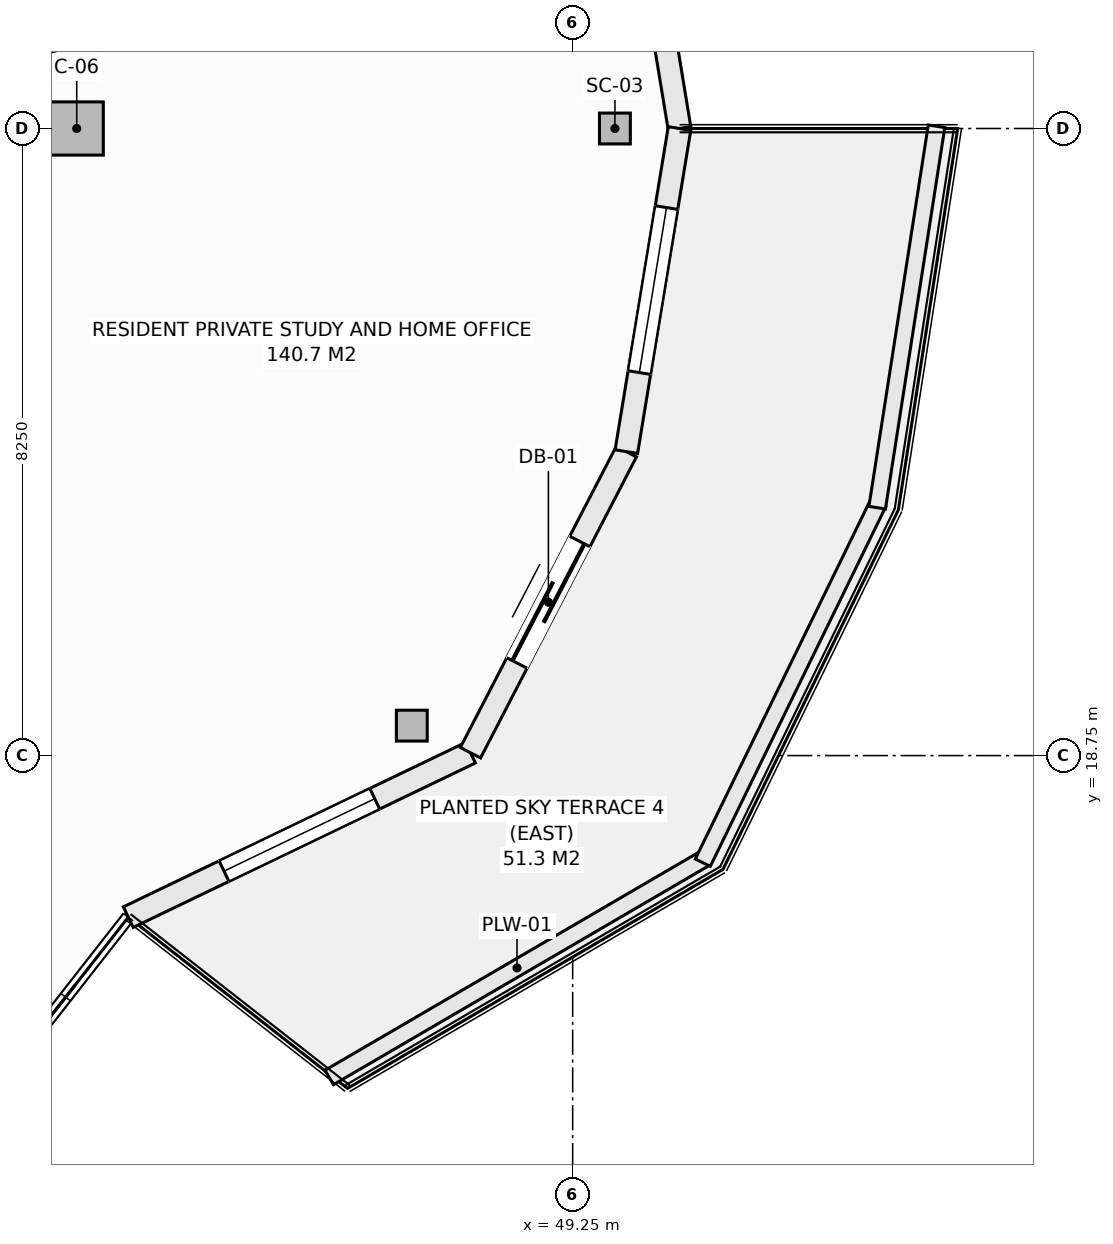
"""IFC4 building model, lengths in metres.
Left out: names, types, materials, properties, quantities, classifications, styles, units other than length and angle.
Written with IfcOpenShell. Run it as: python <this file> out.ifc"""

import sys

from ifc_helpers import new_model, si_unit, direction, frame, frame_2d, origin, origin_2d, place, context, subcontext, project, spatial, rectangle, hollow_rectangle, extrude, element, fill, save


model = new_model("IFC4")
c1 = context("Model", 3, precision=1e-05, world=origin(), true_north=direction((0.0, 1.0)))
c2 = subcontext(c1, "Body", "Model", "MODEL_VIEW")
j1 = project(units=[si_unit("LENGTHUNIT", "METRE"), si_unit("PLANEANGLEUNIT", "RADIAN")], contexts=[c1])
p1 = place(None, origin())
s1 = spatial("IfcSite", under=j1, at=p1, CompositionType="ELEMENT")
p2 = place(p1, origin())
s2 = spatial("IfcBuilding", under=s1, at=p2, CompositionType="ELEMENT")
p3 = place(p2, frame((0.0, 0.0, 265.7)))
s3 = spatial("IfcBuildingStorey", under=s2, at=p3, CompositionType="ELEMENT", Elevation=265.7)
for number, where, z_axis, x_axis in (
    (1, (49.806, 27.0, -0.27), (0.0, 0.0, 1.0), (1.0, 0.0, 0.0)),
    (2, (47.134, 19.144, -0.27), (0.0, 0.0, 1.0), (1.0, 0.0, 0.0)),
):
    element("IfcColumn", number, at=place(p3, frame(where, z_axis=z_axis, x_axis=x_axis)), inside=s3, PredefinedType="COLUMN", context=c2, shape_type="SweptSolid", body=[
        extrude(hollow_rectangle(XDim=0.406, YDim=0.406, WallThickness=0.016, at=origin_2d()), origin(), (0.0, 0.0, 1.0), 3.3),
    ])
p4 = place(p3, frame((42.725, 27.0, -0.27), z_axis=(0.0, 0.0, 1.0), x_axis=(1.0, 0.0, 0.0)))
e3 = element("IfcColumn", 3, at=p4, inside=s3, PredefinedType="COLUMN", context=c2, shape_type="SweptSolid", body=[
    extrude(rectangle(XDim=0.7, YDim=0.7, at=origin_2d()), origin(), (0.0, 0.0, 1.0), 3.3),
])
p5 = place(p3, frame((49.957, 31.251, 0.0), z_axis=(0.0, 0.0, 1.0), x_axis=(0.162404622434, -0.98672424649, 0.0)))
e4 = element("IfcWall", 4, at=p5, inside=s3, PredefinedType="SOLIDWALL", context=c2, shape_type="SweptSolid", body=[
    extrude(rectangle(XDim=4.308, YDim=0.3, at=frame_2d((2.154, 0.0))), origin(), (0.0, 0.0, 1.0), 2.605),
])
p6 = place(p5, frame((1.554, 0.0, 0.72)))
e5 = element("IfcOpeningElement", 5, at=p6, cuts=e4, PredefinedType="OPENING", context=c2, shape_type="SweptSolid", body=[
    extrude(rectangle(XDim=1.2, YDim=1.65, at=frame_2d((0.6, 0.825))), frame((0.0, 0.16, 0.0), z_axis=(0.0, -1.0, 0.0), x_axis=(1.0, 0.0, 0.0)), (0.0, 0.0, 1.0), 0.32),
])
p7 = place(p3, frame((43.404, 16.625, 0.0), z_axis=(0.0, 0.0, 1.0), x_axis=(0.901346013132, 0.433099716706, 0.0)))
e6 = element("IfcWall", 6, at=p7, inside=s3, PredefinedType="SOLIDWALL", context=c2, shape_type="SweptSolid", body=[
    extrude(rectangle(XDim=4.994, YDim=0.3, at=frame_2d((2.497, 0.0))), origin(), (0.0, 0.0, 1.0), 2.605),
])
p8 = place(p7, frame((1.397, 0.0, 0.72)))
e7 = element("IfcOpeningElement", 7, at=p8, cuts=e6, PredefinedType="OPENING", context=c2, shape_type="SweptSolid", body=[
    extrude(rectangle(XDim=2.2, YDim=1.65, at=frame_2d((1.1, 0.825))), frame((0.0, 0.16, 0.0), z_axis=(0.0, -1.0, 0.0), x_axis=(1.0, 0.0, 0.0)), (0.0, 0.0, 1.0), 0.32),
])
p9 = place(p3, frame((47.906, 18.788, 0.0), z_axis=(0.0, 0.0, 1.0), x_axis=(0.459801070243, 0.888021945564, 0.0)))
e8 = element("IfcWall", 8, at=p9, inside=s3, PredefinedType="SOLIDWALL", context=c2, shape_type="SweptSolid", body=[
    extrude(rectangle(XDim=4.461, YDim=0.3, at=frame_2d((2.23, 0.0))), origin(), (0.0, 0.0, 1.0), 2.605),
])
p10 = place(p9, frame((1.33, 0.0, 0.0)))
e9 = element("IfcOpeningElement", 9, at=p10, cuts=e8, PredefinedType="OPENING", context=c2, shape_type="SweptSolid", body=[
    extrude(rectangle(XDim=1.8, YDim=2.25, at=frame_2d((0.9, 1.125))), frame((0.0, 0.16, 0.0), z_axis=(0.0, -1.0, 0.0), x_axis=(1.0, 0.0, 0.0)), (0.0, 0.0, 1.0), 0.32),
])
p11 = place(p3, frame((49.957, 22.749, 0.0), z_axis=(0.0, 0.0, 1.0), x_axis=(0.162404622434, 0.98672424649, 0.0)))
e10 = element("IfcWall", 10, at=p11, inside=s3, PredefinedType="SOLIDWALL", context=c2, shape_type="SweptSolid", body=[
    extrude(rectangle(XDim=4.308, YDim=0.3, at=frame_2d((2.154, 0.0))), origin(), (0.0, 0.0, 1.0), 2.605),
])
p12 = place(p11, frame((1.054, 0.0, 0.72)))
e11 = element("IfcOpeningElement", 11, at=p12, cuts=e10, PredefinedType="OPENING", context=c2, shape_type="SweptSolid", body=[
    extrude(rectangle(XDim=2.2, YDim=1.65, at=frame_2d((1.1, 0.825))), frame((0.0, 0.16, 0.0), z_axis=(0.0, -1.0, 0.0), x_axis=(1.0, 0.0, 0.0)), (0.0, 0.0, 1.0), 0.32),
])
p13 = place(p3, frame((46.048, 14.515, 0.0), z_axis=(0.0, 0.0, 1.0), x_axis=(0.863803671285, 0.503828559606, 0.0)))
e12 = element("IfcWall", 12, at=p13, inside=s3, PredefinedType="PARAPET", context=c2, shape_type="SweptSolid", body=[
    extrude(rectangle(XDim=5.719, YDim=0.22, at=frame_2d((2.86, 0.0))), origin(), (0.0, 0.0, 1.0), 0.52),
])
p14 = place(p3, frame((50.962, 17.341, 0.0), z_axis=(0.0, 0.0, 1.0), x_axis=(0.438469339137, 0.898746148051, 0.0)))
e13 = element("IfcWall", 13, at=p14, inside=s3, PredefinedType="PARAPET", context=c2, shape_type="SweptSolid", body=[
    extrude(rectangle(XDim=5.262, YDim=0.22, at=frame_2d((2.631, 0.0))), origin(), (0.0, 0.0, 1.0), 0.52),
])
p15 = place(p3, frame((53.257, 22.011, 0.0), z_axis=(0.0, 0.0, 1.0), x_axis=(0.15374038442, 0.988111276223, 0.0)))
e14 = element("IfcWall", 14, at=p15, inside=s3, PredefinedType="PARAPET", context=c2, shape_type="SweptSolid", body=[
    extrude(rectangle(XDim=5.078, YDim=0.22, at=frame_2d((2.539, 0.0))), origin(), (0.0, 0.0, 1.0), 0.52),
])
p16 = place(p3, frame((41.582, 27.838, 0.0), z_axis=(0.0, 0.0, 1.0), x_axis=(0.961811765236, 0.273711761262, 0.0)))
e15 = element("IfcWall", 15, at=p16, inside=s3, PredefinedType="PARTITIONING", context=c2, shape_type="SweptSolid", body=[
    extrude(rectangle(XDim=8.722, YDim=0.12, at=frame_2d((4.361, 0.0))), origin(), (0.0, 0.0, 1.0), 3.03),
])
p17 = place(p8, origin())
e16 = element("IfcWindow", 16, at=p17, inside=s3, PartitioningType="SINGLE_PANEL", PredefinedType="WINDOW", context=c2, shape_type="SweptSolid", body=[
    extrude(rectangle(XDim=2.2, YDim=1.65, at=frame_2d((1.1, 0.825))), frame((0.0, 0.03, 0.0), z_axis=(0.0, -1.0, 0.0), x_axis=(1.0, 0.0, 0.0)), (0.0, 0.0, 1.0), 0.06),
])
fill(e7, e16)
p18 = place(p10, frame((1.8, 0.0, 0.0), z_axis=(0.0, 0.0, 1.0), x_axis=(-1.0, 0.0, 0.0)))
e17 = element("IfcDoor", 17, at=p18, inside=s3, OperationType="SLIDING_TO_LEFT", PredefinedType="DOOR", context=c2, shape_type="SweptSolid", body=[
    extrude(rectangle(XDim=1.8, YDim=2.25, at=frame_2d((0.9, 1.125))), frame((0.0, 0.025, 0.0), z_axis=(0.0, -1.0, 0.0), x_axis=(1.0, 0.0, 0.0)), (0.0, 0.0, 1.0), 0.05),
])
fill(e9, e17)
p19 = place(p12, origin())
e18 = element("IfcWindow", 18, at=p19, inside=s3, PartitioningType="SINGLE_PANEL", PredefinedType="WINDOW", context=c2, shape_type="SweptSolid", body=[
    extrude(rectangle(XDim=2.2, YDim=1.65, at=frame_2d((1.1, 0.825))), frame((0.0, 0.03, 0.0), z_axis=(0.0, -1.0, 0.0), x_axis=(1.0, 0.0, 0.0)), (0.0, 0.0, 1.0), 0.06),
])
fill(e11, e18)
save(model, sys.argv[1])
